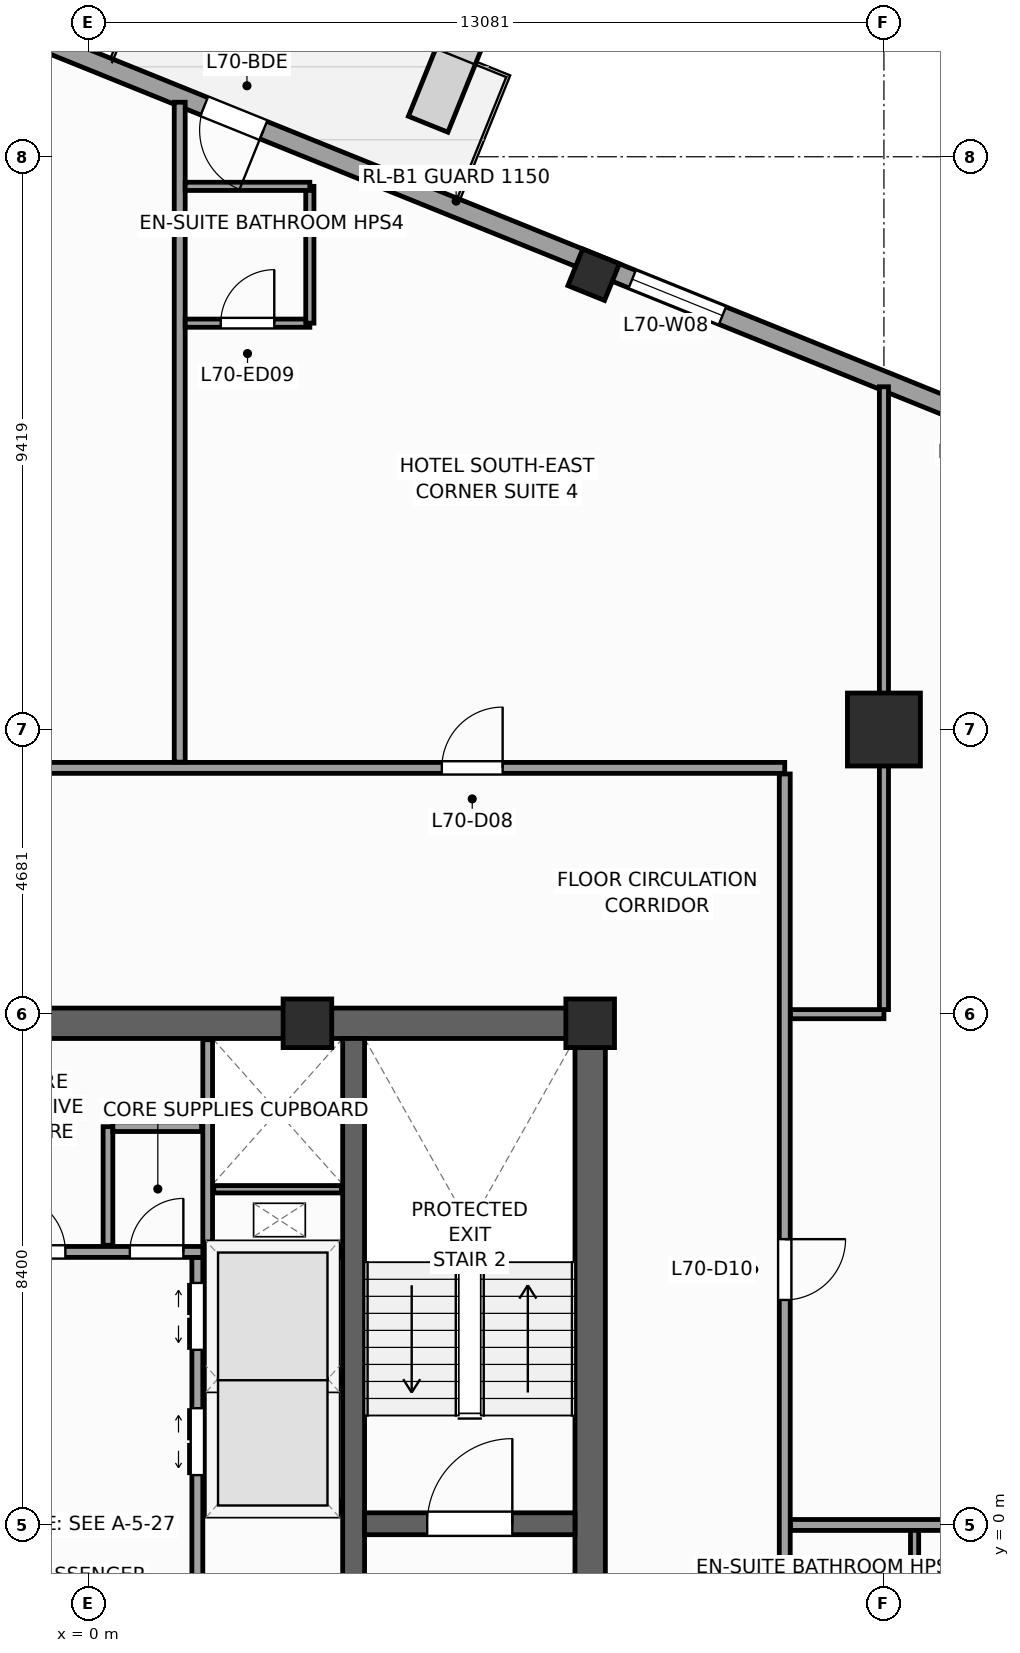
"""IFC4 building model, lengths in metres.
Left out: names, types, materials, properties, quantities, classifications, styles, units other than length and angle.
Written with IfcOpenShell. Run it as: python <this file> out.ifc"""

import sys

from ifc_helpers import new_model, si_unit, direction, frame, frame_2d, origin, origin_2d, place, context, subcontext, project, spatial, rectangle, extrude, source, transform, mapped, element, fill, save


model = new_model("IFC4")
c1 = context("Model", 3, precision=1e-05, world=origin(), true_north=direction((0.0, 1.0)))
c2 = subcontext(c1, "Body", "Model", "MODEL_VIEW")
j1 = project(units=[si_unit("LENGTHUNIT", "METRE"), si_unit("PLANEANGLEUNIT", "RADIAN")], contexts=[c1])
p1 = place(None, origin())
s1 = spatial("IfcSite", under=j1, at=p1, CompositionType="ELEMENT")
p2 = place(p1, origin())
s2 = spatial("IfcBuilding", under=s1, at=p2, CompositionType="ELEMENT")
p3 = place(p2, frame((0.0, 0.0, 286.8)))
s3 = spatial("IfcBuildingStorey", under=s2, at=p3, CompositionType="ELEMENT", Elevation=286.8)
p4 = place(p3, frame((-8.5, 8.25, 0.0), z_axis=(0.0, 0.0, 1.0), x_axis=(1.0, 0.0, 0.0)))
e1 = element("IfcWall", 1, at=p4, inside=s3, PredefinedType="SHEAR", context=c2, shape_type="SweptSolid", body=[
    extrude(rectangle(XDim=17.0, YDim=0.5, at=frame_2d((8.5, 0.0))), origin(), (0.0, 0.0, 1.0), 3.6),
])
p5 = place(p3, frame((8.25, -8.0, 0.0), z_axis=(0.0, 0.0, 1.0), x_axis=(0.0, 1.0, 0.0)))
e2 = element("IfcWall", 2, at=p5, inside=s3, PredefinedType="SHEAR", context=c2, shape_type="SweptSolid", body=[
    extrude(rectangle(XDim=16.0, YDim=0.5, at=frame_2d((8.0, 0.0))), origin(), (0.0, 0.0, 1.0), 3.6),
])
p6 = place(p5, frame((4.69, 0.0, 0.0)))
e3 = element("IfcOpeningElement", 3, at=p6, cuts=e2, PredefinedType="OPENING", context=c2, shape_type="SweptSolid", body=[
    extrude(rectangle(XDim=1.3, YDim=2.2, at=frame_2d((0.65, 1.1))), frame((0.0, 0.26, 0.0), z_axis=(0.0, -1.0, 0.0), x_axis=(1.0, 0.0, 0.0)), (0.0, 0.0, 1.0), 0.52),
])
p7 = place(p3, frame((4.36, -8.0, 0.0), z_axis=(0.0, 0.0, 1.0), x_axis=(0.0, 1.0, 0.0)))
e4 = element("IfcWall", 4, at=p7, inside=s3, PredefinedType="SHEAR", context=c2, shape_type="SweptSolid", body=[
    extrude(rectangle(XDim=16.0, YDim=0.36, at=frame_2d((8.0, 0.0))), origin(), (0.0, 0.0, 1.0), 3.6),
])
p8 = place(p3, frame((4.54, 0.02, 0.0), z_axis=(0.0, 0.0, 1.0), x_axis=(1.0, 0.0, 0.0)))
e5 = element("IfcWall", 5, at=p8, inside=s3, PredefinedType="SHEAR", context=c2, shape_type="SweptSolid", body=[
    extrude(rectangle(XDim=3.46, YDim=0.36, at=frame_2d((1.73, 0.0))), origin(), (0.0, 0.0, 1.0), 3.6),
])
p9 = place(p8, frame((1.03, 0.0, 0.0)))
e6 = element("IfcOpeningElement", 6, at=p9, cuts=e5, PredefinedType="OPENING", context=c2, shape_type="SweptSolid", body=[
    extrude(rectangle(XDim=1.4, YDim=2.2, at=frame_2d((0.7, 1.1))), frame((0.0, 0.19, 0.0), z_axis=(0.0, -1.0, 0.0), x_axis=(1.0, 0.0, 0.0)), (0.0, 0.0, 1.0), 0.38),
])
m1 = source(origin(), c2, "Body", "SweptSolid", [
    extrude(rectangle(XDim=0.8, YDim=0.8, at=origin_2d()), origin(), (0.0, 0.0, 1.0), 3.6),
])
for number, where, z_axis, x_axis in (
    (7, (8.25, 8.25, 0.0), (0.0, 0.0, 1.0), (1.0, 0.0, 0.0)),
    (8, (3.6, 8.25, 0.0), (0.0, 0.0, 1.0), (1.0, 0.0, 0.0)),
):
    element("IfcColumn", number, at=place(p3, frame(where, z_axis=z_axis, x_axis=x_axis)), inside=s3, PredefinedType="PILASTER", context=c2, shape_type="MappedRepresentation", body=[
        mapped(m1, transform((0.0, 0.0, 0.0), scale=1.0)),
    ])
m2 = source(origin(), c2, "Body", "SweptSolid", [
    extrude(rectangle(XDim=1.2, YDim=1.2, at=origin_2d()), origin(), (0.0, 0.0, 1.0), 3.6),
])
p10 = place(p3, frame((13.081, 13.081, 0.0), z_axis=(0.0, 0.0, 1.0), x_axis=(1.0, 0.0, 0.0)))
e9 = element("IfcColumn", 9, at=p10, inside=s3, PredefinedType="COLUMN", context=c2, shape_type="MappedRepresentation", body=[
    mapped(m2, transform((0.0, 0.0, 0.0), scale=1.0)),
])
m3 = source(origin(), c2, "Body", "SweptSolid", [
    extrude(rectangle(XDim=0.65, YDim=0.65, at=origin_2d()), origin(), (0.0, 0.0, 1.0), 3.6),
])
p11 = place(p3, frame((8.307, 20.56, 0.0), z_axis=(0.0, 0.0, 1.0), x_axis=(0.374606593416, 0.927183854567, 0.0)))
e10 = element("IfcColumn", 10, at=p11, inside=s3, PredefinedType="COLUMN", context=c2, shape_type="MappedRepresentation", body=[
    mapped(m3, transform((0.0, 0.0, 0.0), scale=1.0)),
])
p12 = place(p3, frame((23.813, 14.479, 0.0), z_axis=(0.0, 0.0, 1.0), x_axis=(-0.927182657188, 0.374609557019, 0.0)))
e11 = element("IfcWall", 11, at=p12, inside=s3, PredefinedType="STANDARD", context=c2, shape_type="SweptSolid", body=[
    extrude(rectangle(XDim=33.31, YDim=0.31, at=frame_2d((16.655, 0.0))), origin(), (0.0, 0.0, 1.0), 2.75),
])
p13 = place(p12, frame((22.58, 0.0, 0.0)))
e12 = element("IfcOpeningElement", 12, at=p13, cuts=e11, PredefinedType="OPENING", context=c2, shape_type="SweptSolid", body=[
    extrude(rectangle(XDim=1.05, YDim=2.25, at=frame_2d((0.525, 1.125))), frame((0.0, 0.165, 0.0), z_axis=(0.0, -1.0, 0.0), x_axis=(1.0, 0.0, 0.0)), (0.0, 0.0, 1.0), 0.33),
])
p14 = place(p12, frame((3.197, 0.0, 0.47)))
e13 = element("IfcOpeningElement", 13, at=p14, cuts=e11, PredefinedType="OPENING", context=c2, shape_type="SweptSolid", body=[
    extrude(rectangle(XDim=1.6, YDim=2.1, at=frame_2d((0.8, 1.05))), frame((0.0, 0.165, 0.0), z_axis=(0.0, -1.0, 0.0), x_axis=(1.0, 0.0, 0.0)), (0.0, 0.0, 1.0), 0.33),
])
p15 = place(p12, frame((8.86, 0.0, 0.47)))
e14 = element("IfcOpeningElement", 14, at=p15, cuts=e11, PredefinedType="OPENING", context=c2, shape_type="SweptSolid", body=[
    extrude(rectangle(XDim=1.6, YDim=2.1, at=frame_2d((0.8, 1.05))), frame((0.0, 0.165, 0.0), z_axis=(0.0, -1.0, 0.0), x_axis=(1.0, 0.0, 0.0)), (0.0, 0.0, 1.0), 0.33),
])
p16 = place(p12, frame((14.439, 0.0, 0.47)))
e15 = element("IfcOpeningElement", 15, at=p16, cuts=e11, PredefinedType="OPENING", context=c2, shape_type="SweptSolid", body=[
    extrude(rectangle(XDim=1.6, YDim=2.1, at=frame_2d((0.8, 1.05))), frame((0.0, 0.165, 0.0), z_axis=(0.0, -1.0, 0.0), x_axis=(1.0, 0.0, 0.0)), (0.0, 0.0, 1.0), 0.33),
])
p17 = place(p12, frame((27.847, 0.0, 0.47)))
e16 = element("IfcOpeningElement", 16, at=p17, cuts=e11, PredefinedType="OPENING", context=c2, shape_type="SweptSolid", body=[
    extrude(rectangle(XDim=1.6, YDim=2.1, at=frame_2d((0.8, 1.05))), frame((0.0, 0.165, 0.0), z_axis=(0.0, -1.0, 0.0), x_axis=(1.0, 0.0, 0.0)), (0.0, 0.0, 1.0), 0.33),
])
p18 = place(p3, frame((1.79, -7.98, 0.0), z_axis=(0.0, 0.0, 1.0), x_axis=(0.0, 1.0, 0.0)))
e17 = element("IfcWall", 17, at=p18, inside=s3, PredefinedType="PARTITIONING", context=c2, shape_type="SweptSolid", body=[
    extrude(rectangle(XDim=12.38, YDim=0.18, at=frame_2d((6.19, 0.0))), origin(), (0.0, 0.0, 1.0), 3.35),
])
p19 = place(p18, frame((8.8, 0.0, 0.0)))
e18 = element("IfcOpeningElement", 18, at=p19, cuts=e17, PredefinedType="OPENING", context=c2, shape_type="SweptSolid", body=[
    extrude(rectangle(XDim=1.1, YDim=2.2, at=frame_2d((0.55, 1.1))), frame((0.0, 0.1, 0.0), z_axis=(0.0, -1.0, 0.0), x_axis=(1.0, 0.0, 0.0)), (0.0, 0.0, 1.0), 0.2),
])
p20 = place(p18, frame((10.86, 0.0, 0.0)))
e19 = element("IfcOpeningElement", 19, at=p20, cuts=e17, PredefinedType="OPENING", context=c2, shape_type="SweptSolid", body=[
    extrude(rectangle(XDim=1.1, YDim=2.2, at=frame_2d((0.55, 1.1))), frame((0.0, 0.1, 0.0), z_axis=(0.0, -1.0, 0.0), x_axis=(1.0, 0.0, 0.0)), (0.0, 0.0, 1.0), 0.2),
])
p21 = place(p18, frame((3.5, 0.0, 0.0)))
e20 = element("IfcOpeningElement", 20, at=p21, cuts=e17, PredefinedType="OPENING", context=c2, shape_type="SweptSolid", body=[
    extrude(rectangle(XDim=1.15, YDim=2.25, at=frame_2d((0.575, 1.125))), frame((0.0, 0.1, 0.0), z_axis=(0.0, -1.0, 0.0), x_axis=(1.0, 0.0, 0.0)), (0.0, 0.0, 1.0), 0.2),
])
p22 = place(p3, frame((-1.88, 4.49, 0.0), z_axis=(0.0, 0.0, 1.0), x_axis=(1.0, 0.0, 0.0)))
e21 = element("IfcWall", 21, at=p22, inside=s3, PredefinedType="PARTITIONING", context=c2, shape_type="SweptSolid", body=[
    extrude(rectangle(XDim=3.76, YDim=0.18, at=frame_2d((1.88, 0.0))), origin(), (0.0, 0.0, 1.0), 3.35),
])
p23 = place(p22, frame((0.55, 0.0, 0.0)))
e22 = element("IfcOpeningElement", 22, at=p23, cuts=e21, PredefinedType="OPENING", context=c2, shape_type="SweptSolid", body=[
    extrude(rectangle(XDim=0.95, YDim=2.1, at=frame_2d((0.475, 1.05))), frame((0.0, 0.1, 0.0), z_axis=(0.0, -1.0, 0.0), x_axis=(1.0, 0.0, 0.0)), (0.0, 0.0, 1.0), 0.2),
])
p24 = place(p22, frame((2.56, 0.0, 0.0)))
e23 = element("IfcOpeningElement", 23, at=p24, cuts=e21, PredefinedType="OPENING", context=c2, shape_type="SweptSolid", body=[
    extrude(rectangle(XDim=0.88, YDim=2.1, at=frame_2d((0.44, 1.05))), frame((0.0, 0.1, 0.0), z_axis=(0.0, -1.0, 0.0), x_axis=(1.0, 0.0, 0.0)), (0.0, 0.0, 1.0), 0.2),
])
for number, where, z_axis, x_axis in (
    (24, (1.89, 0.3, 0.0), (0.0, 0.0, 1.0), (1.0, 0.0, 0.0)),
    (25, (1.89, 4.49, 0.0), (0.0, 0.0, 1.0), (1.0, 0.0, 0.0)),
):
    element("IfcWall", number, at=place(p3, frame(where, z_axis=z_axis, x_axis=x_axis)), inside=s3, PredefinedType="PARTITIONING", context=c2, shape_type="SweptSolid", body=[
        extrude(rectangle(XDim=2.28, YDim=0.18, at=frame_2d((1.14, 0.0))), origin(), (0.0, 0.0, 1.0), 3.35),
    ])
p25 = place(p3, frame((1.9, 2.4, 0.0), z_axis=(0.0, 0.0, 1.0), x_axis=(1.0, 0.0, 0.0)))
e26 = element("IfcWall", 26, at=p25, inside=s3, PredefinedType="PARTITIONING", context=c2, shape_type="SweptSolid", body=[
    extrude(rectangle(XDim=2.26, YDim=0.12, at=frame_2d((1.13, 0.0))), origin(), (0.0, 0.0, 1.0), 3.35),
])
p26 = place(p3, frame((1.96, 4.58, 0.0), z_axis=(0.0, 0.0, 1.0), x_axis=(0.0, 1.0, 0.0)))
e27 = element("IfcWall", 27, at=p26, inside=s3, PredefinedType="PARTITIONING", context=c2, shape_type="SweptSolid", body=[
    extrude(rectangle(XDim=3.4, YDim=0.16, at=frame_2d((1.7, 0.0))), origin(), (0.0, 0.0, 1.0), 3.35),
])
p27 = place(p3, frame((2.06, 5.52, 0.0), z_axis=(0.0, 0.0, 1.0), x_axis=(1.0, 0.0, 0.0)))
e28 = element("IfcWall", 28, at=p27, inside=s3, PredefinedType="PARTITIONING", context=c2, shape_type="SweptSolid", body=[
    extrude(rectangle(XDim=2.1, YDim=0.12, at=frame_2d((1.05, 0.0))), origin(), (0.0, 0.0, 1.0), 3.35),
])
p28 = place(p3, frame((0.32, 4.6, 0.0), z_axis=(0.0, 0.0, 1.0), x_axis=(0.0, 1.0, 0.0)))
e29 = element("IfcWall", 29, at=p28, inside=s3, PredefinedType="PARTITIONING", context=c2, shape_type="SweptSolid", body=[
    extrude(rectangle(XDim=1.95, YDim=0.16, at=frame_2d((0.975, 0.0))), origin(), (0.0, 0.0, 1.0), 3.35),
])
p29 = place(p3, frame((0.4, 6.55, 0.0), z_axis=(0.0, 0.0, 1.0), x_axis=(1.0, 0.0, 0.0)))
e30 = element("IfcWall", 30, at=p29, inside=s3, PredefinedType="PARTITIONING", context=c2, shape_type="SweptSolid", body=[
    extrude(rectangle(XDim=1.46, YDim=0.16, at=frame_2d((0.73, 0.0))), origin(), (0.0, 0.0, 1.0), 3.35),
])
p30 = place(p3, frame((-11.35, 12.45, 0.0), z_axis=(0.0, 0.0, 1.0), x_axis=(1.0, 0.0, 0.0)))
e31 = element("IfcWall", 31, at=p30, inside=s3, PredefinedType="PARTITIONING", context=c2, shape_type="SweptSolid", body=[
    extrude(rectangle(XDim=22.8, YDim=0.18, at=frame_2d((11.4, 0.0))), origin(), (0.0, 0.0, 1.0), 3.35),
])
p31 = place(p30, frame((6.089, 0.0, 0.0)))
e32 = element("IfcOpeningElement", 32, at=p31, cuts=e31, PredefinedType="OPENING", context=c2, shape_type="SweptSolid", body=[
    extrude(rectangle(XDim=1.0, YDim=2.15, at=frame_2d((0.5, 1.075))), frame((0.0, 0.1, 0.0), z_axis=(0.0, -1.0, 0.0), x_axis=(1.0, 0.0, 0.0)), (0.0, 0.0, 1.0), 0.2),
])
p32 = place(p30, frame((17.161, 0.0, 0.0)))
e33 = element("IfcOpeningElement", 33, at=p32, cuts=e31, PredefinedType="OPENING", context=c2, shape_type="SweptSolid", body=[
    extrude(rectangle(XDim=1.0, YDim=2.15, at=frame_2d((0.5, 1.075))), frame((0.0, 0.1, 0.0), z_axis=(0.0, -1.0, 0.0), x_axis=(1.0, 0.0, 0.0)), (0.0, 0.0, 1.0), 0.2),
])
p33 = place(p3, frame((11.45, -10.2, 0.0), z_axis=(0.0, 0.0, 1.0), x_axis=(0.0, 1.0, 0.0)))
e34 = element("IfcWall", 34, at=p33, inside=s3, PredefinedType="PARTITIONING", context=c2, shape_type="SweptSolid", body=[
    extrude(rectangle(XDim=22.55, YDim=0.18, at=frame_2d((11.275, 0.0))), origin(), (0.0, 0.0, 1.0), 3.35),
])
p34 = place(p33, frame((13.9, 0.0, 0.0)))
e35 = element("IfcOpeningElement", 35, at=p34, cuts=e34, PredefinedType="OPENING", context=c2, shape_type="SweptSolid", body=[
    extrude(rectangle(XDim=1.0, YDim=2.15, at=frame_2d((0.5, 1.075))), frame((0.0, 0.1, 0.0), z_axis=(0.0, -1.0, 0.0), x_axis=(1.0, 0.0, 0.0)), (0.0, 0.0, 1.0), 0.2),
])
p35 = place(p33, frame((5.5, 0.0, 0.0)))
e36 = element("IfcOpeningElement", 36, at=p35, cuts=e34, PredefinedType="OPENING", context=c2, shape_type="SweptSolid", body=[
    extrude(rectangle(XDim=1.0, YDim=2.15, at=frame_2d((0.5, 1.075))), frame((0.0, 0.1, 0.0), z_axis=(0.0, -1.0, 0.0), x_axis=(1.0, 0.0, 0.0)), (0.0, 0.0, 1.0), 0.2),
])
p36 = place(p3, frame((1.5, 12.545, 0.0), z_axis=(0.0, 0.0, 1.0), x_axis=(0.0, 1.0, 0.0)))
e37 = element("IfcWall", 37, at=p36, inside=s3, PredefinedType="PARTITIONING", context=c2, shape_type="SweptSolid", body=[
    extrude(rectangle(XDim=10.852, YDim=0.18, at=frame_2d((5.426, 0.0))), origin(), (0.0, 0.0, 1.0), 3.35),
])
p37 = place(p3, frame((11.545, 0.0, 0.0), z_axis=(0.0, 0.0, 1.0), x_axis=(1.0, 0.0, 0.0)))
e38 = element("IfcWall", 38, at=p37, inside=s3, PredefinedType="PARTITIONING", context=c2, shape_type="SweptSolid", body=[
    extrude(rectangle(XDim=12.458, YDim=0.18, at=frame_2d((6.229, 0.0))), origin(), (0.0, 0.0, 1.0), 3.02),
])
p38 = place(p3, frame((11.545, 8.4, 0.0), z_axis=(0.0, 0.0, 1.0), x_axis=(1.0, 0.0, 0.0)))
e39 = element("IfcWall", 39, at=p38, inside=s3, PredefinedType="PARTITIONING", context=c2, shape_type="SweptSolid", body=[
    extrude(rectangle(XDim=1.536, YDim=0.15, at=frame_2d((0.768, 0.0))), origin(), (0.0, 0.0, 1.0), 3.35),
])
p39 = place(p3, frame((13.081, 8.475, 0.0), z_axis=(0.0, 0.0, 1.0), x_axis=(0.0, 1.0, 0.0)))
e40 = element("IfcWall", 40, at=p39, inside=s3, PredefinedType="PARTITIONING", context=c2, shape_type="SweptSolid", body=[
    extrude(rectangle(XDim=10.243, YDim=0.15, at=frame_2d((5.121, 0.0))), origin(), (0.0, 0.0, 1.0), 2.45),
])
p40 = place(p3, frame((1.59, 19.763, 0.0), z_axis=(0.0, 0.0, 1.0), x_axis=(1.0, 0.0, 0.0)))
e41 = element("IfcWall", 41, at=p40, inside=s3, PredefinedType="PARTITIONING", context=c2, shape_type="SweptSolid", body=[
    extrude(rectangle(XDim=2.05, YDim=0.135, at=frame_2d((1.025, 0.0))), origin(), (0.0, 0.0, 1.0), 3.35),
])
p41 = place(p40, frame((0.585, 0.0, 0.0)))
e42 = element("IfcOpeningElement", 42, at=p41, cuts=e41, PredefinedType="OPENING", context=c2, shape_type="SweptSolid", body=[
    extrude(rectangle(XDim=0.88, YDim=2.1, at=frame_2d((0.44, 1.05))), frame((0.0, 0.078, 0.0), z_axis=(0.0, -1.0, 0.0), x_axis=(1.0, 0.0, 0.0)), (0.0, 0.0, 1.0), 0.155),
])
p42 = place(p3, frame((3.64, 19.763, 0.0), z_axis=(0.0, 0.0, 1.0), x_axis=(0.0, 1.0, 0.0)))
e43 = element("IfcWall", 43, at=p42, inside=s3, PredefinedType="PARTITIONING", context=c2, shape_type="SweptSolid", body=[
    extrude(rectangle(XDim=2.25, YDim=0.135, at=frame_2d((1.125, 0.0))), origin(), (0.0, 0.0, 1.0), 3.35),
])
p43 = place(p3, frame((1.59, 22.013, 0.0), z_axis=(0.0, 0.0, 1.0), x_axis=(1.0, 0.0, 0.0)))
e44 = element("IfcWall", 44, at=p43, inside=s3, PredefinedType="PARTITIONING", context=c2, shape_type="SweptSolid", body=[
    extrude(rectangle(XDim=2.05, YDim=0.135, at=frame_2d((1.025, 0.0))), origin(), (0.0, 0.0, 1.0), 3.35),
])
p44 = place(p3, frame((13.585, -2.34, 0.0), z_axis=(0.0, 0.0, 1.0), x_axis=(0.0, 1.0, 0.0)))
e45 = element("IfcWall", 45, at=p44, inside=s3, PredefinedType="PARTITIONING", context=c2, shape_type="SweptSolid", body=[
    extrude(rectangle(XDim=2.25, YDim=0.135, at=frame_2d((1.125, 0.0))), origin(), (0.0, 0.0, 1.0), 3.35),
])
m4 = source(origin(), c2, "Body", "SweptSolid", [
    extrude(rectangle(XDim=1.05, YDim=2.25, at=frame_2d((0.525, 1.125))), frame((0.0, 0.025, 0.0), z_axis=(0.0, -1.0, 0.0), x_axis=(1.0, 0.0, 0.0)), (0.0, 0.0, 1.0), 0.05),
])
p45 = place(p13, origin())
e46 = element("IfcDoor", 46, at=p45, inside=s3, OperationType="SINGLE_SWING_LEFT", PredefinedType="DOOR", context=c2, shape_type="MappedRepresentation", body=[
    mapped(m4, transform((0.0, 0.0, 0.0), scale=1.0)),
])
fill(e12, e46)
m5 = source(origin(), c2, "Body", "SweptSolid", [
    extrude(rectangle(XDim=1.6, YDim=2.1, at=frame_2d((0.8, 1.05))), frame((0.0, 0.03, 0.0), z_axis=(0.0, -1.0, 0.0), x_axis=(1.0, 0.0, 0.0)), (0.0, 0.0, 1.0), 0.06),
])
p46 = place(p16, origin())
e47 = element("IfcWindow", 47, at=p46, inside=s3, PartitioningType="SINGLE_PANEL", PredefinedType="WINDOW", context=c2, shape_type="MappedRepresentation", body=[
    mapped(m5, transform((0.0, 0.0, 0.0), scale=1.0)),
])
fill(e15, e47)
m6 = source(origin(), c2, "Body", "SweptSolid", [
    extrude(rectangle(XDim=1.4, YDim=2.2, at=frame_2d((0.7, 1.1))), frame((0.0, 0.025, 0.0), z_axis=(0.0, -1.0, 0.0), x_axis=(1.0, 0.0, 0.0)), (0.0, 0.0, 1.0), 0.05),
])
p47 = place(p9, origin())
e48 = element("IfcDoor", 48, at=p47, inside=s3, OperationType="SINGLE_SWING_RIGHT", PredefinedType="DOOR", context=c2, shape_type="MappedRepresentation", body=[
    mapped(m6, transform((0.0, 0.0, 0.0), scale=1.0)),
])
fill(e6, e48)
m7 = source(origin(), c2, "Body", "SweptSolid", [
    extrude(rectangle(XDim=1.1, YDim=2.2, at=frame_2d((0.55, 1.1))), frame((0.0, 0.025, 0.0), z_axis=(0.0, -1.0, 0.0), x_axis=(1.0, 0.0, 0.0)), (0.0, 0.0, 1.0), 0.05),
])
p48 = place(p19, origin())
e49 = element("IfcDoor", 49, at=p48, inside=s3, OperationType="DOUBLE_DOOR_SLIDING", PredefinedType="DOOR", context=c2, shape_type="MappedRepresentation", body=[
    mapped(m7, transform((0.0, 0.0, 0.0), scale=1.0)),
])
fill(e18, e49)
p49 = place(p20, origin())
e50 = element("IfcDoor", 50, at=p49, inside=s3, OperationType="DOUBLE_DOOR_SLIDING", PredefinedType="DOOR", context=c2, shape_type="MappedRepresentation", body=[
    mapped(m7, transform((0.0, 0.0, 0.0), scale=1.0)),
])
fill(e19, e50)
m8 = source(origin(), c2, "Body", "SweptSolid", [
    extrude(rectangle(XDim=0.95, YDim=2.1, at=frame_2d((0.475, 1.05))), frame((0.0, 0.025, 0.0), z_axis=(0.0, -1.0, 0.0), x_axis=(1.0, 0.0, 0.0)), (0.0, 0.0, 1.0), 0.05),
])
p50 = place(p23, origin())
e51 = element("IfcDoor", 51, at=p50, inside=s3, OperationType="SINGLE_SWING_LEFT", PredefinedType="DOOR", context=c2, shape_type="MappedRepresentation", body=[
    mapped(m8, transform((0.0, 0.0, 0.0), scale=1.0)),
])
fill(e22, e51)
m9 = source(origin(), c2, "Body", "SweptSolid", [
    extrude(rectangle(XDim=0.88, YDim=2.1, at=frame_2d((0.44, 1.05))), frame((0.0, 0.025, 0.0), z_axis=(0.0, -1.0, 0.0), x_axis=(1.0, 0.0, 0.0)), (0.0, 0.0, 1.0), 0.05),
])
p51 = place(p24, origin())
e52 = element("IfcDoor", 52, at=p51, inside=s3, OperationType="SINGLE_SWING_RIGHT", PredefinedType="DOOR", context=c2, shape_type="MappedRepresentation", body=[
    mapped(m9, transform((0.0, 0.0, 0.0), scale=1.0)),
])
fill(e23, e52)
m10 = source(origin(), c2, "Body", "SweptSolid", [
    extrude(rectangle(XDim=1.0, YDim=2.15, at=frame_2d((0.5, 1.075))), frame((0.0, 0.025, 0.0), z_axis=(0.0, -1.0, 0.0), x_axis=(1.0, 0.0, 0.0)), (0.0, 0.0, 1.0), 0.05),
])
p52 = place(p32, origin())
e53 = element("IfcDoor", 53, at=p52, inside=s3, OperationType="SINGLE_SWING_RIGHT", PredefinedType="DOOR", context=c2, shape_type="MappedRepresentation", body=[
    mapped(m10, transform((0.0, 0.0, 0.0), scale=1.0)),
])
fill(e33, e53)
p53 = place(p41, origin())
e54 = element("IfcDoor", 54, at=p53, inside=s3, OperationType="SINGLE_SWING_RIGHT", PredefinedType="DOOR", context=c2, shape_type="MappedRepresentation", body=[
    mapped(m9, transform((0.0, 0.0, 0.0), scale=1.0)),
])
fill(e42, e54)
p54 = place(p34, frame((1.0, 0.0, 0.0), z_axis=(0.0, 0.0, 1.0), x_axis=(-1.0, 0.0, 0.0)))
e55 = element("IfcDoor", 55, at=p54, inside=s3, OperationType="SINGLE_SWING_RIGHT", PredefinedType="DOOR", context=c2, shape_type="MappedRepresentation", body=[
    mapped(m10, transform((0.0, 0.0, 0.0), scale=1.0)),
])
fill(e35, e55)
save(model, sys.argv[1])
